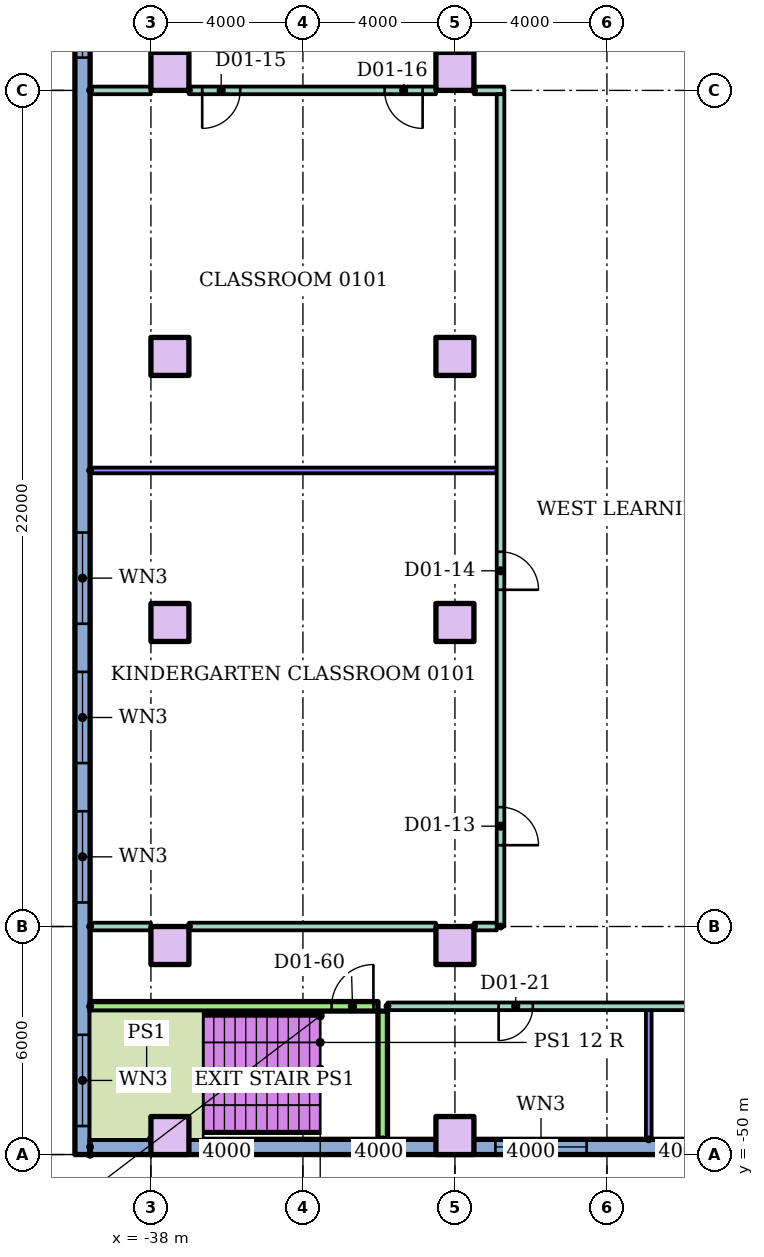
"""IFC4 building model, lengths in metres.
Left out: names, types, materials, properties, quantities, classifications, styles, units other than length and angle.
Written with IfcOpenShell. Run it as: python <this file> out.ifc"""

import sys

from ifc_helpers import new_model, si_unit, direction, frame, frame_2d, origin, origin_2d, place, context, subcontext, project, spatial, rectangle, extrude, element, fill, save


model = new_model("IFC4")
c1 = context("Model", 3, precision=1e-05, world=origin(), true_north=direction((0.0, 1.0)))
c2 = subcontext(c1, "Body", "Model", "MODEL_VIEW")
j1 = project(units=[si_unit("LENGTHUNIT", "METRE"), si_unit("PLANEANGLEUNIT", "RADIAN")], contexts=[c1])
p1 = place(None, origin())
s1 = spatial("IfcSite", under=j1, at=p1, CompositionType="ELEMENT")
p2 = place(p1, origin())
s2 = spatial("IfcBuilding", under=s1, at=p2, CompositionType="ELEMENT")
p3 = place(p2, frame((0.0, 0.0, 6.0)))
s3 = spatial("IfcBuildingStorey", under=s2, at=p3, CompositionType="ELEMENT", Elevation=6.0)
for number, where in (
    (1, (-37.5, -49.5, 0.0)),
    (2, (-30.0, -49.5, 0.0)),
    (3, (-37.5, -44.5, 0.0)),
    (4, (-30.0, -44.5, 0.0)),
    (5, (-37.5, -36.0, 0.0)),
    (6, (-30.0, -36.0, 0.0)),
    (7, (-37.5, -29.0, 0.0)),
    (8, (-30.0, -29.0, 0.0)),
    (9, (-37.5, -21.5, 0.0)),
    (10, (-30.0, -21.5, 0.0)),
):
    element("IfcColumn", number, at=place(p3, frame(where)), inside=s3, PredefinedType="COLUMN", context=c2, shape_type="SweptSolid", body=[
        extrude(rectangle(XDim=1.0, YDim=1.0, at=origin_2d()), origin(), (0.0, 0.0, 1.0), 4.0),
    ])
p4 = place(p3, frame((-39.8, 20.0, 0.0), z_axis=(0.0, 0.0, 1.0), x_axis=(0.0, -1.0, 0.0)))
e11 = element("IfcWall", 11, at=p4, inside=s3, PredefinedType="STANDARD", context=c2, shape_type="SweptSolid", body=[
    extrude(rectangle(XDim=70.0, YDim=0.4, at=frame_2d((35.0, 0.0))), origin(), (0.0, 0.0, 1.0), 3.7),
])
p5 = place(p4, frame((1.05, 0.0, 0.9)))
e12 = element("IfcOpeningElement", 12, at=p5, cuts=e11, PredefinedType="OPENING", context=c2, shape_type="SweptSolid", body=[
    extrude(rectangle(XDim=2.4, YDim=2.1, at=frame_2d((1.2, 1.05))), frame((0.0, 0.21, 0.0), z_axis=(0.0, -1.0, 0.0), x_axis=(1.0, 0.0, 0.0)), (0.0, 0.0, 1.0), 0.42),
])
p6 = place(p4, frame((5.55, 0.0, 0.9)))
e13 = element("IfcOpeningElement", 13, at=p6, cuts=e11, PredefinedType="OPENING", context=c2, shape_type="SweptSolid", body=[
    extrude(rectangle(XDim=2.4, YDim=2.1, at=frame_2d((1.2, 1.05))), frame((0.0, 0.21, 0.0), z_axis=(0.0, -1.0, 0.0), x_axis=(1.0, 0.0, 0.0)), (0.0, 0.0, 1.0), 0.42),
])
p7 = place(p4, frame((9.863, 0.0, 0.9)))
e14 = element("IfcOpeningElement", 14, at=p7, cuts=e11, PredefinedType="OPENING", context=c2, shape_type="SweptSolid", body=[
    extrude(rectangle(XDim=2.4, YDim=2.1, at=frame_2d((1.2, 1.05))), frame((0.0, 0.21, 0.0), z_axis=(0.0, -1.0, 0.0), x_axis=(1.0, 0.0, 0.0)), (0.0, 0.0, 1.0), 0.42),
])
p8 = place(p4, frame((13.988, 0.0, 0.9)))
e15 = element("IfcOpeningElement", 15, at=p8, cuts=e11, PredefinedType="OPENING", context=c2, shape_type="SweptSolid", body=[
    extrude(rectangle(XDim=2.4, YDim=2.1, at=frame_2d((1.2, 1.05))), frame((0.0, 0.21, 0.0), z_axis=(0.0, -1.0, 0.0), x_axis=(1.0, 0.0, 0.0)), (0.0, 0.0, 1.0), 0.42),
])
p9 = place(p4, frame((18.113, 0.0, 0.9)))
e16 = element("IfcOpeningElement", 16, at=p9, cuts=e11, PredefinedType="OPENING", context=c2, shape_type="SweptSolid", body=[
    extrude(rectangle(XDim=2.4, YDim=2.1, at=frame_2d((1.2, 1.05))), frame((0.0, 0.21, 0.0), z_axis=(0.0, -1.0, 0.0), x_axis=(1.0, 0.0, 0.0)), (0.0, 0.0, 1.0), 0.42),
])
p10 = place(p4, frame((22.238, 0.0, 0.9)))
e17 = element("IfcOpeningElement", 17, at=p10, cuts=e11, PredefinedType="OPENING", context=c2, shape_type="SweptSolid", body=[
    extrude(rectangle(XDim=2.4, YDim=2.1, at=frame_2d((1.2, 1.05))), frame((0.0, 0.21, 0.0), z_axis=(0.0, -1.0, 0.0), x_axis=(1.0, 0.0, 0.0)), (0.0, 0.0, 1.0), 0.42),
])
p11 = place(p4, frame((26.363, 0.0, 0.9)))
e18 = element("IfcOpeningElement", 18, at=p11, cuts=e11, PredefinedType="OPENING", context=c2, shape_type="SweptSolid", body=[
    extrude(rectangle(XDim=2.4, YDim=2.1, at=frame_2d((1.2, 1.05))), frame((0.0, 0.21, 0.0), z_axis=(0.0, -1.0, 0.0), x_axis=(1.0, 0.0, 0.0)), (0.0, 0.0, 1.0), 0.42),
])
p12 = place(p4, frame((30.488, 0.0, 0.9)))
e19 = element("IfcOpeningElement", 19, at=p12, cuts=e11, PredefinedType="OPENING", context=c2, shape_type="SweptSolid", body=[
    extrude(rectangle(XDim=2.4, YDim=2.1, at=frame_2d((1.2, 1.05))), frame((0.0, 0.21, 0.0), z_axis=(0.0, -1.0, 0.0), x_axis=(1.0, 0.0, 0.0)), (0.0, 0.0, 1.0), 0.42),
])
p13 = place(p4, frame((34.613, 0.0, 0.9)))
e20 = element("IfcOpeningElement", 20, at=p13, cuts=e11, PredefinedType="OPENING", context=c2, shape_type="SweptSolid", body=[
    extrude(rectangle(XDim=2.4, YDim=2.1, at=frame_2d((1.2, 1.05))), frame((0.0, 0.21, 0.0), z_axis=(0.0, -1.0, 0.0), x_axis=(1.0, 0.0, 0.0)), (0.0, 0.0, 1.0), 0.42),
])
p14 = place(p4, frame((38.738, 0.0, 0.9)))
e21 = element("IfcOpeningElement", 21, at=p14, cuts=e11, PredefinedType="OPENING", context=c2, shape_type="SweptSolid", body=[
    extrude(rectangle(XDim=2.4, YDim=2.1, at=frame_2d((1.2, 1.05))), frame((0.0, 0.21, 0.0), z_axis=(0.0, -1.0, 0.0), x_axis=(1.0, 0.0, 0.0)), (0.0, 0.0, 1.0), 0.42),
])
p15 = place(p4, frame((53.633, 0.0, 0.9)))
e22 = element("IfcOpeningElement", 22, at=p15, cuts=e11, PredefinedType="OPENING", context=c2, shape_type="SweptSolid", body=[
    extrude(rectangle(XDim=2.4, YDim=2.1, at=frame_2d((1.2, 1.05))), frame((0.0, 0.21, 0.0), z_axis=(0.0, -1.0, 0.0), x_axis=(1.0, 0.0, 0.0)), (0.0, 0.0, 1.0), 0.42),
])
p16 = place(p4, frame((57.3, 0.0, 0.9)))
e23 = element("IfcOpeningElement", 23, at=p16, cuts=e11, PredefinedType="OPENING", context=c2, shape_type="SweptSolid", body=[
    extrude(rectangle(XDim=2.4, YDim=2.1, at=frame_2d((1.2, 1.05))), frame((0.0, 0.21, 0.0), z_axis=(0.0, -1.0, 0.0), x_axis=(1.0, 0.0, 0.0)), (0.0, 0.0, 1.0), 0.42),
])
p17 = place(p4, frame((60.967, 0.0, 0.9)))
e24 = element("IfcOpeningElement", 24, at=p17, cuts=e11, PredefinedType="OPENING", context=c2, shape_type="SweptSolid", body=[
    extrude(rectangle(XDim=2.4, YDim=2.1, at=frame_2d((1.2, 1.05))), frame((0.0, 0.21, 0.0), z_axis=(0.0, -1.0, 0.0), x_axis=(1.0, 0.0, 0.0)), (0.0, 0.0, 1.0), 0.42),
])
p18 = place(p4, frame((66.85, 0.0, 0.9)))
e25 = element("IfcOpeningElement", 25, at=p18, cuts=e11, PredefinedType="OPENING", context=c2, shape_type="SweptSolid", body=[
    extrude(rectangle(XDim=2.4, YDim=2.1, at=frame_2d((1.2, 1.05))), frame((0.0, 0.21, 0.0), z_axis=(0.0, -1.0, 0.0), x_axis=(1.0, 0.0, 0.0)), (0.0, 0.0, 1.0), 0.42),
])
p19 = place(p3, frame((-39.6, -49.8, 0.0)))
e26 = element("IfcWall", 26, at=p19, inside=s3, PredefinedType="STANDARD", context=c2, shape_type="SweptSolid", body=[
    extrude(rectangle(XDim=79.2, YDim=0.4, at=frame_2d((39.6, 0.0))), origin(), (0.0, 0.0, 1.0), 3.7),
])
p20 = place(p19, frame((10.665, 0.0, 0.9)))
e27 = element("IfcOpeningElement", 27, at=p20, cuts=e26, PredefinedType="OPENING", context=c2, shape_type="SweptSolid", body=[
    extrude(rectangle(XDim=2.4, YDim=2.1, at=frame_2d((1.2, 1.05))), frame((0.0, 0.21, 0.0), z_axis=(0.0, -1.0, 0.0), x_axis=(1.0, 0.0, 0.0)), (0.0, 0.0, 1.0), 0.42),
])
p21 = place(p19, frame((18.665, 0.0, 0.9)))
e28 = element("IfcOpeningElement", 28, at=p21, cuts=e26, PredefinedType="OPENING", context=c2, shape_type="SweptSolid", body=[
    extrude(rectangle(XDim=2.4, YDim=2.1, at=frame_2d((1.2, 1.05))), frame((0.0, 0.21, 0.0), z_axis=(0.0, -1.0, 0.0), x_axis=(1.0, 0.0, 0.0)), (0.0, 0.0, 1.0), 0.42),
])
p22 = place(p19, frame((22.135, 0.0, 0.9)))
e29 = element("IfcOpeningElement", 29, at=p22, cuts=e26, PredefinedType="OPENING", context=c2, shape_type="SweptSolid", body=[
    extrude(rectangle(XDim=2.4, YDim=2.1, at=frame_2d((1.2, 1.05))), frame((0.0, 0.21, 0.0), z_axis=(0.0, -1.0, 0.0), x_axis=(1.0, 0.0, 0.0)), (0.0, 0.0, 1.0), 0.42),
])
p23 = place(p19, frame((30.135, 0.0, 0.9)))
e30 = element("IfcOpeningElement", 30, at=p23, cuts=e26, PredefinedType="OPENING", context=c2, shape_type="SweptSolid", body=[
    extrude(rectangle(XDim=2.05, YDim=2.1, at=frame_2d((1.025, 1.05))), frame((0.0, 0.21, 0.0), z_axis=(0.0, -1.0, 0.0), x_axis=(1.0, 0.0, 0.0)), (0.0, 0.0, 1.0), 0.42),
])
p24 = place(p19, frame((38.135, 0.0, 0.9)))
e31 = element("IfcOpeningElement", 31, at=p24, cuts=e26, PredefinedType="OPENING", context=c2, shape_type="SweptSolid", body=[
    extrude(rectangle(XDim=2.4, YDim=2.1, at=frame_2d((1.2, 1.05))), frame((0.0, 0.21, 0.0), z_axis=(0.0, -1.0, 0.0), x_axis=(1.0, 0.0, 0.0)), (0.0, 0.0, 1.0), 0.42),
])
p25 = place(p19, frame((47.015, 0.0, 0.9)))
e32 = element("IfcOpeningElement", 32, at=p25, cuts=e26, PredefinedType="OPENING", context=c2, shape_type="SweptSolid", body=[
    extrude(rectangle(XDim=1.52, YDim=2.1, at=frame_2d((0.76, 1.05))), frame((0.0, 0.21, 0.0), z_axis=(0.0, -1.0, 0.0), x_axis=(1.0, 0.0, 0.0)), (0.0, 0.0, 1.0), 0.42),
])
p26 = place(p19, frame((54.135, 0.0, 0.9)))
e33 = element("IfcOpeningElement", 33, at=p26, cuts=e26, PredefinedType="OPENING", context=c2, shape_type="SweptSolid", body=[
    extrude(rectangle(XDim=2.4, YDim=2.1, at=frame_2d((1.2, 1.05))), frame((0.0, 0.21, 0.0), z_axis=(0.0, -1.0, 0.0), x_axis=(1.0, 0.0, 0.0)), (0.0, 0.0, 1.0), 0.42),
])
p27 = place(p19, frame((66.665, 0.0, 0.9)))
e34 = element("IfcOpeningElement", 34, at=p27, cuts=e26, PredefinedType="OPENING", context=c2, shape_type="SweptSolid", body=[
    extrude(rectangle(XDim=2.4, YDim=2.1, at=frame_2d((1.2, 1.05))), frame((0.0, 0.21, 0.0), z_axis=(0.0, -1.0, 0.0), x_axis=(1.0, 0.0, 0.0)), (0.0, 0.0, 1.0), 0.42),
])
p28 = place(p3, frame((-31.775, -46.1, 0.0)))
e35 = element("IfcWall", 35, at=p28, inside=s3, PredefinedType="PARTITIONING", context=c2, shape_type="SweptSolid", body=[
    extrude(rectangle(XDim=19.65, YDim=0.2, at=frame_2d((9.825, 0.0))), origin(), (0.0, 0.0, 1.0), 3.7),
])
p29 = place(p28, frame((2.925, 0.0, 0.0)))
e36 = element("IfcOpeningElement", 36, at=p29, cuts=e35, PredefinedType="OPENING", context=c2, shape_type="SweptSolid", body=[
    extrude(rectangle(XDim=0.9, YDim=2.1, at=frame_2d((0.45, 1.05))), frame((0.0, 0.11, 0.0), z_axis=(0.0, -1.0, 0.0), x_axis=(1.0, 0.0, 0.0)), (0.0, 0.0, 1.0), 0.22),
])
p30 = place(p28, frame((12.875, 0.0, 0.0)))
e37 = element("IfcOpeningElement", 37, at=p30, cuts=e35, PredefinedType="OPENING", context=c2, shape_type="SweptSolid", body=[
    extrude(rectangle(XDim=0.9, YDim=2.1, at=frame_2d((0.45, 1.05))), frame((0.0, 0.11, 0.0), z_axis=(0.0, -1.0, 0.0), x_axis=(1.0, 0.0, 0.0)), (0.0, 0.0, 1.0), 0.22),
])
p31 = place(p3, frame((-39.6, -46.1, 0.0)))
e38 = element("IfcWall", 38, at=p31, inside=s3, PredefinedType="SOLIDWALL", context=c2, shape_type="SweptSolid", body=[
    extrude(rectangle(XDim=7.575, YDim=0.25, at=frame_2d((3.788, 0.0))), origin(), (0.0, 0.0, 1.0), 3.7),
])
p32 = place(p31, frame((6.355, 0.0, 0.0)))
e39 = element("IfcOpeningElement", 39, at=p32, cuts=e38, PredefinedType="OPENING", context=c2, shape_type="SweptSolid", body=[
    extrude(rectangle(XDim=1.1, YDim=2.1, at=frame_2d((0.55, 1.05))), frame((0.0, 0.135, 0.0), z_axis=(0.0, -1.0, 0.0), x_axis=(1.0, 0.0, 0.0)), (0.0, 0.0, 1.0), 0.27),
])
p33 = place(p3, frame((-39.6, -44.0, 0.0)))
e40 = element("IfcWall", 40, at=p33, inside=s3, PredefinedType="PARTITIONING", context=c2, shape_type="SweptSolid", body=[
    extrude(rectangle(XDim=1.6, YDim=0.2, at=frame_2d((0.8, 0.0))), origin(), (0.0, 0.0, 1.0), 3.7),
])
p34 = place(p3, frame((-37.0, -44.0, 0.0)))
e41 = element("IfcWall", 41, at=p34, inside=s3, PredefinedType="PARTITIONING", context=c2, shape_type="SweptSolid", body=[
    extrude(rectangle(XDim=6.5, YDim=0.2, at=frame_2d((3.25, 0.0))), origin(), (0.0, 0.0, 1.0), 3.7),
])
p35 = place(p3, frame((-29.5, -44.0, 0.0)))
e42 = element("IfcWall", 42, at=p35, inside=s3, PredefinedType="PARTITIONING", context=c2, shape_type="SweptSolid", body=[
    extrude(rectangle(XDim=0.6, YDim=0.2, at=frame_2d((0.3, 0.0))), origin(), (0.0, 0.0, 1.0), 3.7),
])
p36 = place(p3, frame((-39.6, -32.0, 0.0)))
e43 = element("IfcWall", 43, at=p36, inside=s3, PredefinedType="PARTITIONING", context=c2, shape_type="SweptSolid", body=[
    extrude(rectangle(XDim=10.7, YDim=0.15, at=frame_2d((5.35, 0.0))), origin(), (0.0, 0.0, 1.0), 3.7),
])
p37 = place(p3, frame((-39.6, -22.0, 0.0)))
e44 = element("IfcWall", 44, at=p37, inside=s3, PredefinedType="PARTITIONING", context=c2, shape_type="SweptSolid", body=[
    extrude(rectangle(XDim=1.6, YDim=0.2, at=frame_2d((0.8, 0.0))), origin(), (0.0, 0.0, 1.0), 3.7),
])
p38 = place(p3, frame((-37.0, -22.0, 0.0)))
e45 = element("IfcWall", 45, at=p38, inside=s3, PredefinedType="PARTITIONING", context=c2, shape_type="SweptSolid", body=[
    extrude(rectangle(XDim=6.5, YDim=0.2, at=frame_2d((3.25, 0.0))), origin(), (0.0, 0.0, 1.0), 3.7),
])
p39 = place(p38, frame((0.35, 0.0, 0.0)))
e46 = element("IfcOpeningElement", 46, at=p39, cuts=e45, PredefinedType="OPENING", context=c2, shape_type="SweptSolid", body=[
    extrude(rectangle(XDim=1.0, YDim=2.1, at=frame_2d((0.5, 1.05))), frame((0.0, 0.11, 0.0), z_axis=(0.0, -1.0, 0.0), x_axis=(1.0, 0.0, 0.0)), (0.0, 0.0, 1.0), 0.22),
])
p40 = place(p38, frame((5.15, 0.0, 0.0)))
e47 = element("IfcOpeningElement", 47, at=p40, cuts=e45, PredefinedType="OPENING", context=c2, shape_type="SweptSolid", body=[
    extrude(rectangle(XDim=1.0, YDim=2.1, at=frame_2d((0.5, 1.05))), frame((0.0, 0.11, 0.0), z_axis=(0.0, -1.0, 0.0), x_axis=(1.0, 0.0, 0.0)), (0.0, 0.0, 1.0), 0.22),
])
p41 = place(p3, frame((-29.5, -22.0, 0.0)))
e48 = element("IfcWall", 48, at=p41, inside=s3, PredefinedType="PARTITIONING", context=c2, shape_type="SweptSolid", body=[
    extrude(rectangle(XDim=0.8, YDim=0.2, at=frame_2d((0.4, 0.0))), origin(), (0.0, 0.0, 1.0), 3.7),
])
p42 = place(p3, frame((-31.9, -49.6, 0.0), z_axis=(0.0, 0.0, 1.0), x_axis=(0.0, 1.0, 0.0)))
e49 = element("IfcWall", 49, at=p42, inside=s3, PredefinedType="SOLIDWALL", context=c2, shape_type="SweptSolid", body=[
    extrude(rectangle(XDim=3.375, YDim=0.25, at=frame_2d((1.688, 0.0))), origin(), (0.0, 0.0, 1.0), 3.7),
])
p43 = place(p3, frame((-28.8, -44.0, 0.0), z_axis=(0.0, 0.0, 1.0), x_axis=(0.0, 1.0, 0.0)))
e50 = element("IfcWall", 50, at=p43, inside=s3, PredefinedType="PARTITIONING", context=c2, shape_type="SweptSolid", body=[
    extrude(rectangle(XDim=21.9, YDim=0.2, at=frame_2d((10.95, 0.0))), origin(), (0.0, 0.0, 1.0), 3.7),
])
p44 = place(p43, frame((2.14, 0.0, 0.0)))
e51 = element("IfcOpeningElement", 51, at=p44, cuts=e50, PredefinedType="OPENING", context=c2, shape_type="SweptSolid", body=[
    extrude(rectangle(XDim=1.0, YDim=2.1, at=frame_2d((0.5, 1.05))), frame((0.0, 0.11, 0.0), z_axis=(0.0, -1.0, 0.0), x_axis=(1.0, 0.0, 0.0)), (0.0, 0.0, 1.0), 0.22),
])
p45 = place(p43, frame((8.86, 0.0, 0.0)))
e52 = element("IfcOpeningElement", 52, at=p45, cuts=e50, PredefinedType="OPENING", context=c2, shape_type="SweptSolid", body=[
    extrude(rectangle(XDim=1.0, YDim=2.1, at=frame_2d((0.5, 1.05))), frame((0.0, 0.11, 0.0), z_axis=(0.0, -1.0, 0.0), x_axis=(1.0, 0.0, 0.0)), (0.0, 0.0, 1.0), 0.22),
])
p46 = place(p3, frame((-24.9, -49.6, 0.0), z_axis=(0.0, 0.0, 1.0), x_axis=(0.0, 1.0, 0.0)))
e53 = element("IfcWall", 53, at=p46, inside=s3, PredefinedType="PARTITIONING", context=c2, shape_type="SweptSolid", body=[
    extrude(rectangle(XDim=3.4, YDim=0.15, at=frame_2d((1.7, 0.0))), origin(), (0.0, 0.0, 1.0), 3.7),
])
p47 = place(p14, origin())
e54 = element("IfcWindow", 54, at=p47, inside=s3, PartitioningType="SINGLE_PANEL", PredefinedType="WINDOW", context=c2, shape_type="SweptSolid", body=[
    extrude(rectangle(XDim=2.4, YDim=2.1, at=frame_2d((1.2, 1.05))), frame((0.0, 0.03, 0.0), z_axis=(0.0, -1.0, 0.0), x_axis=(1.0, 0.0, 0.0)), (0.0, 0.0, 1.0), 0.06),
])
fill(e21, e54)
p48 = place(p15, origin())
e55 = element("IfcWindow", 55, at=p48, inside=s3, PartitioningType="SINGLE_PANEL", PredefinedType="WINDOW", context=c2, shape_type="SweptSolid", body=[
    extrude(rectangle(XDim=2.4, YDim=2.1, at=frame_2d((1.2, 1.05))), frame((0.0, 0.03, 0.0), z_axis=(0.0, -1.0, 0.0), x_axis=(1.0, 0.0, 0.0)), (0.0, 0.0, 1.0), 0.06),
])
fill(e22, e55)
p49 = place(p16, origin())
e56 = element("IfcWindow", 56, at=p49, inside=s3, PartitioningType="SINGLE_PANEL", PredefinedType="WINDOW", context=c2, shape_type="SweptSolid", body=[
    extrude(rectangle(XDim=2.4, YDim=2.1, at=frame_2d((1.2, 1.05))), frame((0.0, 0.03, 0.0), z_axis=(0.0, -1.0, 0.0), x_axis=(1.0, 0.0, 0.0)), (0.0, 0.0, 1.0), 0.06),
])
fill(e23, e56)
p50 = place(p17, origin())
e57 = element("IfcWindow", 57, at=p50, inside=s3, PartitioningType="SINGLE_PANEL", PredefinedType="WINDOW", context=c2, shape_type="SweptSolid", body=[
    extrude(rectangle(XDim=2.4, YDim=2.1, at=frame_2d((1.2, 1.05))), frame((0.0, 0.03, 0.0), z_axis=(0.0, -1.0, 0.0), x_axis=(1.0, 0.0, 0.0)), (0.0, 0.0, 1.0), 0.06),
])
fill(e24, e57)
p51 = place(p18, origin())
e58 = element("IfcWindow", 58, at=p51, inside=s3, PartitioningType="SINGLE_PANEL", PredefinedType="WINDOW", context=c2, shape_type="SweptSolid", body=[
    extrude(rectangle(XDim=2.4, YDim=2.1, at=frame_2d((1.2, 1.05))), frame((0.0, 0.03, 0.0), z_axis=(0.0, -1.0, 0.0), x_axis=(1.0, 0.0, 0.0)), (0.0, 0.0, 1.0), 0.06),
])
fill(e25, e58)
p52 = place(p20, origin())
e59 = element("IfcWindow", 59, at=p52, inside=s3, PartitioningType="SINGLE_PANEL", PredefinedType="WINDOW", context=c2, shape_type="SweptSolid", body=[
    extrude(rectangle(XDim=2.4, YDim=2.1, at=frame_2d((1.2, 1.05))), frame((0.0, 0.03, 0.0), z_axis=(0.0, -1.0, 0.0), x_axis=(1.0, 0.0, 0.0)), (0.0, 0.0, 1.0), 0.06),
])
fill(e27, e59)
p53 = place(p44, frame((1.0, 0.0, 0.0), z_axis=(0.0, 0.0, 1.0), x_axis=(-1.0, 0.0, 0.0)))
e60 = element("IfcDoor", 60, at=p53, inside=s3, OperationType="SINGLE_SWING_LEFT", PredefinedType="DOOR", context=c2, shape_type="SweptSolid", body=[
    extrude(rectangle(XDim=1.0, YDim=2.1, at=frame_2d((0.5, 1.05))), frame((0.0, 0.025, 0.0), z_axis=(0.0, -1.0, 0.0), x_axis=(1.0, 0.0, 0.0)), (0.0, 0.0, 1.0), 0.05),
])
fill(e51, e60)
p54 = place(p45, frame((1.0, 0.0, 0.0), z_axis=(0.0, 0.0, 1.0), x_axis=(-1.0, 0.0, 0.0)))
e61 = element("IfcDoor", 61, at=p54, inside=s3, OperationType="SINGLE_SWING_LEFT", PredefinedType="DOOR", context=c2, shape_type="SweptSolid", body=[
    extrude(rectangle(XDim=1.0, YDim=2.1, at=frame_2d((0.5, 1.05))), frame((0.0, 0.025, 0.0), z_axis=(0.0, -1.0, 0.0), x_axis=(1.0, 0.0, 0.0)), (0.0, 0.0, 1.0), 0.05),
])
fill(e52, e61)
p55 = place(p39, frame((1.0, 0.0, 0.0), z_axis=(0.0, 0.0, 1.0), x_axis=(-1.0, 0.0, 0.0)))
e62 = element("IfcDoor", 62, at=p55, inside=s3, OperationType="SINGLE_SWING_LEFT", PredefinedType="DOOR", context=c2, shape_type="SweptSolid", body=[
    extrude(rectangle(XDim=1.0, YDim=2.1, at=frame_2d((0.5, 1.05))), frame((0.0, 0.025, 0.0), z_axis=(0.0, -1.0, 0.0), x_axis=(1.0, 0.0, 0.0)), (0.0, 0.0, 1.0), 0.05),
])
fill(e46, e62)
p56 = place(p40, frame((1.0, 0.0, 0.0), z_axis=(0.0, 0.0, 1.0), x_axis=(-1.0, 0.0, 0.0)))
e63 = element("IfcDoor", 63, at=p56, inside=s3, OperationType="SINGLE_SWING_RIGHT", PredefinedType="DOOR", context=c2, shape_type="SweptSolid", body=[
    extrude(rectangle(XDim=1.0, YDim=2.1, at=frame_2d((0.5, 1.05))), frame((0.0, 0.025, 0.0), z_axis=(0.0, -1.0, 0.0), x_axis=(1.0, 0.0, 0.0)), (0.0, 0.0, 1.0), 0.05),
])
fill(e47, e63)
p57 = place(p29, frame((0.9, 0.0, 0.0), z_axis=(0.0, 0.0, 1.0), x_axis=(-1.0, 0.0, 0.0)))
e64 = element("IfcDoor", 64, at=p57, inside=s3, OperationType="SINGLE_SWING_LEFT", PredefinedType="DOOR", context=c2, shape_type="SweptSolid", body=[
    extrude(rectangle(XDim=0.9, YDim=2.1, at=frame_2d((0.45, 1.05))), frame((0.0, 0.025, 0.0), z_axis=(0.0, -1.0, 0.0), x_axis=(1.0, 0.0, 0.0)), (0.0, 0.0, 1.0), 0.05),
])
fill(e36, e64)
p58 = place(p32, origin())
e65 = element("IfcDoor", 65, at=p58, inside=s3, OperationType="SINGLE_SWING_RIGHT", PredefinedType="DOOR", context=c2, shape_type="SweptSolid", body=[
    extrude(rectangle(XDim=1.1, YDim=2.1, at=frame_2d((0.55, 1.05))), frame((0.0, 0.025, 0.0), z_axis=(0.0, -1.0, 0.0), x_axis=(1.0, 0.0, 0.0)), (0.0, 0.0, 1.0), 0.05),
])
fill(e39, e65)
save(model, sys.argv[1])
